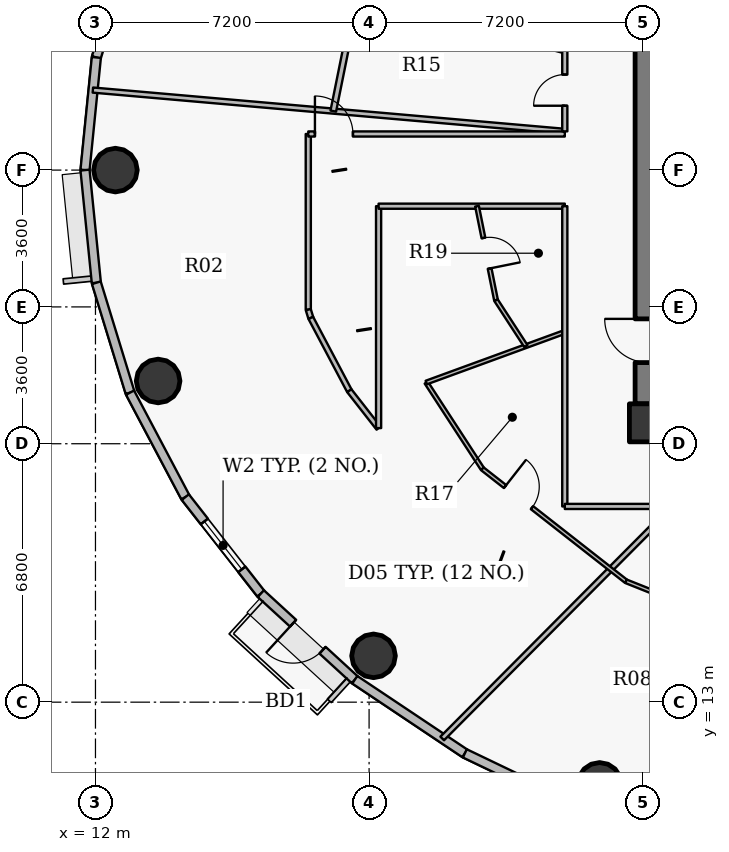
"""IFC4 building model, lengths in metres.
Left out: names, types, materials, properties, quantities, classifications, styles, units other than length and angle.
Written with IfcOpenShell. Run it as: python <this file> out.ifc"""

import sys

from ifc_helpers import new_model, si_unit, direction, frame, frame_2d, origin, origin_2d, place, context, subcontext, project, spatial, rectangle, hollow_circle, extrude, source, transform, mapped, element, fill, save


model = new_model("IFC4")
c1 = context("Model", 3, precision=1e-05, world=origin(), true_north=direction((0.0, 1.0)))
c2 = subcontext(c1, "Body", "Model", "MODEL_VIEW")
j1 = project(units=[si_unit("LENGTHUNIT", "METRE"), si_unit("PLANEANGLEUNIT", "RADIAN")], contexts=[c1])
p1 = place(None, origin())
s1 = spatial("IfcSite", under=j1, at=p1, CompositionType="ELEMENT")
p2 = place(p1, origin())
s2 = spatial("IfcBuilding", under=s1, at=p2, CompositionType="ELEMENT")
p3 = place(p2, frame((0.0, 0.0, 247.8)))
s3 = spatial("IfcBuildingStorey", under=s2, at=p3, CompositionType="ELEMENT", Elevation=247.8)
p4 = place(p3, frame((26.55, 20.35, 0.0), z_axis=(0.0, 0.0, 1.0), x_axis=(1.0, 0.0, 0.0)))
e1 = element("IfcColumn", 1, at=p4, inside=s3, PredefinedType="COLUMN", context=c2, shape_type="SweptSolid", body=[
    extrude(rectangle(XDim=1.0, YDim=1.0, at=origin_2d()), origin(), (0.0, 0.0, 1.0), 3.75),
])
p5 = place(p3, frame((26.55, 20.85, 0.0), z_axis=(0.0, 0.0, 1.0), x_axis=(0.0, 1.0, 0.0)))
e2 = element("IfcWall", 2, at=p5, inside=s3, PredefinedType="SHEAR", context=c2, shape_type="SweptSolid", body=[
    extrude(rectangle(XDim=12.3, YDim=0.7, at=frame_2d((6.15, 0.0))), origin(), (0.0, 0.0, 1.0), 3.05),
])
p6 = place(p5, frame((1.085, 0.0, 0.0)))
e3 = element("IfcOpeningElement", 3, at=p6, cuts=e2, PredefinedType="OPENING", context=c2, shape_type="SweptSolid", body=[
    extrude(rectangle(XDim=1.15, YDim=2.15, at=origin_2d()), frame((0.575, 0.36, 1.075), z_axis=(0.0, -1.0, 0.0), x_axis=(1.0, 0.0, 0.0)), (0.0, 0.0, 1.0), 0.72),
])
for number, where, z_axis, x_axis in (
    (4, (12.525, 27.0, 0.0), (0.0, 0.0, 1.0), (1.0, 0.0, 0.0)),
    (5, (13.649, 21.451, 0.0), (0.0, 0.0, 1.0), (1.0, 0.0, 0.0)),
    (6, (19.317, 14.219, 0.0), (0.0, 0.0, 1.0), (1.0, 0.0, 0.0)),
    (7, (25.265, 10.836, 0.0), (0.0, 0.0, 1.0), (1.0, 0.0, 0.0)),
):
    element("IfcColumn", number, at=place(p3, frame(where, z_axis=z_axis, x_axis=x_axis)), inside=s3, PredefinedType="COLUMN", context=c2, shape_type="SweptSolid", body=[
        extrude(hollow_circle(Radius=0.575, WallThickness=0.036, at=origin_2d()), origin(), (0.0, 0.0, 1.0), 3.75),
    ])
p7 = place(p3, frame((12.023, 29.964, 0.0), z_axis=(0.0, 0.0, 1.0), x_axis=(0.293132907334, 0.95607170162, 0.0)))
e8 = element("IfcWall", 8, at=p7, inside=s3, PredefinedType="SOLIDWALL", context=c2, shape_type="SweptSolid", body=[
    extrude(rectangle(XDim=3.025, YDim=0.24, at=frame_2d((1.512, 0.0))), origin(), (0.0, 0.0, 1.0), 3.5),
])
p8 = place(p7, frame((0.887, 0.0, 0.9)))
e9 = element("IfcOpeningElement", 9, at=p8, cuts=e8, PredefinedType="OPENING", context=c2, shape_type="SweptSolid", body=[
    extrude(rectangle(XDim=1.25, YDim=1.65, at=origin_2d()), frame((0.625, 0.13, 0.825), z_axis=(0.0, -1.0, 0.0), x_axis=(1.0, 0.0, 0.0)), (0.0, 0.0, 1.0), 0.26),
])
for number, where, z_axis, x_axis in (
    (10, (11.725, 27.0, 0.0), (0.0, 0.0, 1.0), (0.1, 0.995, 0.0)),
    (11, (12.023, 24.036, 0.0), (0.0, 0.0, 1.0), (-0.1, 0.995, 0.0)),
):
    element("IfcWall", number, at=place(p3, frame(where, z_axis=z_axis, x_axis=x_axis)), inside=s3, PredefinedType="SOLIDWALL", context=c2, shape_type="SweptSolid", body=[
        extrude(rectangle(XDim=2.979, YDim=0.24, at=frame_2d((1.489, 0.0))), origin(), (0.0, 0.0, 1.0), 3.5),
    ])
p9 = place(p3, frame((12.91, 21.144, 0.0), z_axis=(0.0, 0.0, 1.0), x_axis=(-0.293132907334, 0.95607170162, 0.0)))
e12 = element("IfcWall", 12, at=p9, inside=s3, PredefinedType="SOLIDWALL", context=c2, shape_type="SweptSolid", body=[
    extrude(rectangle(XDim=3.025, YDim=0.24, at=frame_2d((1.512, 0.0))), origin(), (0.0, 0.0, 1.0), 3.5),
])
p10 = place(p3, frame((14.364, 18.395, 0.0), z_axis=(0.0, 0.0, 1.0), x_axis=(-0.46766049993, 0.883908172157, 0.0)))
e13 = element("IfcWall", 13, at=p10, inside=s3, PredefinedType="SOLIDWALL", context=c2, shape_type="SweptSolid", body=[
    extrude(rectangle(XDim=3.11, YDim=0.24, at=frame_2d((1.555, 0.0))), origin(), (0.0, 0.0, 1.0), 3.5),
])
p11 = place(p3, frame((16.352, 15.855, 0.0), z_axis=(0.0, 0.0, 1.0), x_axis=(-0.616312344705, 0.787501805562, 0.0)))
e14 = element("IfcWall", 14, at=p11, inside=s3, PredefinedType="SOLIDWALL", context=c2, shape_type="SweptSolid", body=[
    extrude(rectangle(XDim=3.225, YDim=0.24, at=frame_2d((1.612, 0.0))), origin(), (0.0, 0.0, 1.0), 3.5),
])
p12 = place(p11, frame((0.812, 0.0, 0.9)))
e15 = element("IfcOpeningElement", 15, at=p12, cuts=e14, PredefinedType="OPENING", context=c2, shape_type="SweptSolid", body=[
    extrude(rectangle(XDim=1.6, YDim=1.75, at=origin_2d()), frame((0.8, 0.13, 0.875), z_axis=(0.0, -1.0, 0.0), x_axis=(1.0, 0.0, 0.0)), (0.0, 0.0, 1.0), 0.26),
])
p13 = place(p3, frame((18.824, 13.589, 0.0), z_axis=(0.0, 0.0, 1.0), x_axis=(-0.737123922599, 0.675757591694, 0.0)))
e16 = element("IfcWall", 16, at=p13, inside=s3, PredefinedType="SOLIDWALL", context=c2, shape_type="SweptSolid", body=[
    extrude(rectangle(XDim=3.354, YDim=0.24, at=frame_2d((1.677, 0.0))), origin(), (0.0, 0.0, 1.0), 3.5),
])
p14 = place(p13, frame((1.152, 0.0, 0.0)))
e17 = element("IfcOpeningElement", 17, at=p14, cuts=e16, PredefinedType="OPENING", context=c2, shape_type="SweptSolid", body=[
    extrude(rectangle(XDim=1.05, YDim=2.15, at=origin_2d()), frame((0.525, 0.13, 1.075), z_axis=(0.0, -1.0, 0.0), x_axis=(1.0, 0.0, 0.0)), (0.0, 0.0, 1.0), 0.26),
])
p15 = place(p3, frame((21.72, 11.652, 0.0), z_axis=(0.0, 0.0, 1.0), x_axis=(-0.831262496074, 0.555880079352, 0.0)))
e18 = element("IfcWall", 18, at=p15, inside=s3, PredefinedType="SOLIDWALL", context=c2, shape_type="SweptSolid", body=[
    extrude(rectangle(XDim=3.484, YDim=0.24, at=frame_2d((1.742, 0.0))), origin(), (0.0, 0.0, 1.0), 3.5),
])
p16 = place(p3, frame((24.969, 10.094, 0.0), z_axis=(0.0, 0.0, 1.0), x_axis=(-0.901598104751, 0.432574684313, 0.0)))
e19 = element("IfcWall", 19, at=p16, inside=s3, PredefinedType="SOLIDWALL", context=c2, shape_type="SweptSolid", body=[
    extrude(rectangle(XDim=3.604, YDim=0.24, at=frame_2d((1.802, 0.0))), origin(), (0.0, 0.0, 1.0), 3.5),
])
p17 = place(p3, frame((11.932, 29.106, 0.0), z_axis=(0.0, 0.0, 1.0), x_axis=(0.996194886619, -0.08715358784, 0.0)))
e20 = element("IfcWall", 20, at=p17, inside=s3, PredefinedType="PARTITIONING", context=c2, shape_type="SweptSolid", body=[
    extrude(rectangle(XDim=12.466, YDim=0.135, at=frame_2d((6.233, 0.0))), origin(), (0.0, 0.0, 1.0), 2.985),
])
p18 = place(p3, frame((13.082, 33.192, 0.0), z_axis=(0.0, 0.0, 1.0), x_axis=(0.965379480797, -0.26084949311, 0.0)))
e21 = element("IfcWall", 21, at=p18, inside=s3, PredefinedType="PARTITIONING", context=c2, shape_type="SweptSolid", body=[
    extrude(rectangle(XDim=11.672, YDim=0.15, at=frame_2d((5.836, 0.0))), origin(), (0.0, 0.0, 1.0), 2.985),
])
p19 = place(p18, frame((2.549, 0.0, 0.0)))
e22 = element("IfcOpeningElement", 22, at=p19, cuts=e21, PredefinedType="OPENING", context=c2, shape_type="SweptSolid", body=[
    extrude(rectangle(XDim=1.05, YDim=2.15, at=origin_2d()), frame((0.525, 0.085, 1.075), z_axis=(0.0, -1.0, 0.0), x_axis=(1.0, 0.0, 0.0)), (0.0, 0.0, 1.0), 0.17),
])
p20 = place(p3, frame((17.6, 23.328, 0.0), z_axis=(0.0, 0.0, 1.0), x_axis=(0.0, 1.0, 0.0)))
e23 = element("IfcWall", 23, at=p20, inside=s3, PredefinedType="PARTITIONING", context=c2, shape_type="SweptSolid", body=[
    extrude(rectangle(XDim=4.622, YDim=0.135, at=frame_2d((2.311, 0.0))), origin(), (0.0, 0.0, 1.0), 2.935),
])
p21 = place(p3, frame((17.6, 23.328, 0.0), z_axis=(0.0, 0.0, 1.0), x_axis=(0.292875000845, -0.956150738053, 0.0)))
e24 = element("IfcWall", 24, at=p21, inside=s3, PredefinedType="PARTITIONING", context=c2, shape_type="SweptSolid", body=[
    extrude(rectangle(XDim=0.227, YDim=0.135, at=frame_2d((0.113, 0.0))), origin(), (0.0, 0.0, 1.0), 3.5),
])
p22 = place(p3, frame((17.6, 27.95, 0.0), z_axis=(0.0, 0.0, 1.0), x_axis=(1.0, 0.0, 0.0)))
e25 = element("IfcWall", 25, at=p22, inside=s3, PredefinedType="PARTITIONING", context=c2, shape_type="SweptSolid", body=[
    extrude(rectangle(XDim=6.75, YDim=0.135, at=frame_2d((3.375, 0.0))), origin(), (0.0, 0.0, 1.0), 3.5),
])
p23 = place(p22, frame((0.175, 0.0, 0.0)))
e26 = element("IfcOpeningElement", 26, at=p23, cuts=e25, PredefinedType="OPENING", context=c2, shape_type="SweptSolid", body=[
    extrude(rectangle(XDim=1.0, YDim=2.15, at=origin_2d()), frame((0.5, 0.078, 1.075), z_axis=(0.0, -1.0, 0.0), x_axis=(1.0, 0.0, 0.0)), (0.0, 0.0, 1.0), 0.155),
])
p24 = place(p3, frame((17.667, 23.111, 0.0), z_axis=(0.0, 0.0, 1.0), x_axis=(0.467675622269, -0.883900171024, 0.0)))
e27 = element("IfcWall", 27, at=p24, inside=s3, PredefinedType="PARTITIONING", context=c2, shape_type="SweptSolid", body=[
    extrude(rectangle(XDim=2.168, YDim=0.135, at=frame_2d((1.084, 0.0))), origin(), (0.0, 0.0, 1.0), 2.935),
])
p25 = place(p3, frame((18.258, 28.552, 0.0), z_axis=(0.0, 0.0, 1.0), x_axis=(0.198206962436, 0.980160191011, 0.0)))
e28 = element("IfcWall", 28, at=p25, inside=s3, PredefinedType="PARTITIONING", context=c2, shape_type="SweptSolid", body=[
    extrude(rectangle(XDim=2.874, YDim=0.15, at=frame_2d((1.437, 0.0))), origin(), (0.0, 0.0, 1.0), 3.5),
])
p26 = place(p3, frame((18.681, 21.194, 0.0), z_axis=(0.0, 0.0, 1.0), x_axis=(0.616239706802, -0.787558647823, 0.0)))
e29 = element("IfcWall", 29, at=p26, inside=s3, PredefinedType="PARTITIONING", context=c2, shape_type="SweptSolid", body=[
    extrude(rectangle(XDim=1.248, YDim=0.135, at=frame_2d((0.624, 0.0))), origin(), (0.0, 0.0, 1.0), 3.5),
])
p27 = place(p3, frame((19.45, 20.211, 0.0), z_axis=(0.0, 0.0, 1.0), x_axis=(0.0, 1.0, 0.0)))
e30 = element("IfcWall", 30, at=p27, inside=s3, PredefinedType="PARTITIONING", context=c2, shape_type="SweptSolid", body=[
    extrude(rectangle(XDim=5.839, YDim=0.135, at=frame_2d((2.919, 0.0))), origin(), (0.0, 0.0, 1.0), 2.935),
])
p28 = place(p3, frame((19.45, 26.05, 0.0), z_axis=(0.0, 0.0, 1.0), x_axis=(1.0, 0.0, 0.0)))
e31 = element("IfcWall", 31, at=p28, inside=s3, PredefinedType="PARTITIONING", context=c2, shape_type="SweptSolid", body=[
    extrude(rectangle(XDim=4.9, YDim=0.135, at=frame_2d((2.45, 0.0))), origin(), (0.0, 0.0, 1.0), 3.5),
])
p29 = place(p3, frame((20.704, 21.41, 0.0), z_axis=(0.0, 0.0, 1.0), x_axis=(0.545431767871, -0.838155228223, 0.0)))
e32 = element("IfcWall", 32, at=p29, inside=s3, PredefinedType="PARTITIONING", context=c2, shape_type="SweptSolid", body=[
    extrude(rectangle(XDim=2.709, YDim=0.1, at=frame_2d((1.354, 0.0))), origin(), (0.0, 0.0, 1.0), 3.5),
])
p30 = place(p3, frame((20.704, 21.41, 0.0), z_axis=(0.0, 0.0, 1.0), x_axis=(0.939230218299, 0.343287921481, 0.0)))
e33 = element("IfcWall", 33, at=p30, inside=s3, PredefinedType="PARTITIONING", context=c2, shape_type="SweptSolid", body=[
    extrude(rectangle(XDim=3.882, YDim=0.1, at=frame_2d((1.941, 0.0))), origin(), (0.0, 0.0, 1.0), 3.5),
])
p31 = place(p3, frame((21.124, 12.045, 0.0), z_axis=(0.0, 0.0, 1.0), x_axis=(0.70521888308, 0.708989652215, 0.0)))
e34 = element("IfcWall", 34, at=p31, inside=s3, PredefinedType="PARTITIONING", context=c2, shape_type="SweptSolid", body=[
    extrude(rectangle(XDim=8.611, YDim=0.135, at=frame_2d((4.306, 0.0))), origin(), (0.0, 0.0, 1.0), 2.985),
])
p32 = place(p3, frame((22.04, 26.05, 0.0), z_axis=(0.0, 0.0, 1.0), x_axis=(0.198273230268, -0.980146788067, 0.0)))
e35 = element("IfcWall", 35, at=p32, inside=s3, PredefinedType="PARTITIONING", context=c2, shape_type="SweptSolid", body=[
    extrude(rectangle(XDim=2.524, YDim=0.1, at=frame_2d((1.262, 0.0))), origin(), (0.0, 0.0, 1.0), 2.935),
])
p33 = place(p32, frame((0.852, 0.0, 0.0)))
e36 = element("IfcOpeningElement", 36, at=p33, cuts=e35, PredefinedType="OPENING", context=c2, shape_type="SweptSolid", body=[
    extrude(rectangle(XDim=0.82, YDim=2.1, at=origin_2d()), frame((0.41, 0.06, 1.05), z_axis=(0.0, -1.0, 0.0), x_axis=(1.0, 0.0, 0.0)), (0.0, 0.0, 1.0), 0.12),
])
p34 = place(p3, frame((22.182, 19.139, 0.0), z_axis=(0.0, 0.0, 1.0), x_axis=(0.787386902975, -0.616459134917, 0.0)))
e37 = element("IfcWall", 37, at=p34, inside=s3, PredefinedType="PARTITIONING", context=c2, shape_type="SweptSolid", body=[
    extrude(rectangle(XDim=4.799, YDim=0.1, at=frame_2d((2.399, 0.0))), origin(), (0.0, 0.0, 1.0), 2.935),
])
p35 = place(p34, frame((0.757, 0.0, 0.0)))
e38 = element("IfcOpeningElement", 38, at=p35, cuts=e37, PredefinedType="OPENING", context=c2, shape_type="SweptSolid", body=[
    extrude(rectangle(XDim=0.9, YDim=2.1, at=origin_2d()), frame((0.45, 0.06, 1.05), z_axis=(0.0, -1.0, 0.0), x_axis=(1.0, 0.0, 0.0)), (0.0, 0.0, 1.0), 0.12),
])
p36 = place(p3, frame((22.541, 23.576, 0.0), z_axis=(0.0, 0.0, 1.0), x_axis=(0.545399208044, -0.838176415717, 0.0)))
e39 = element("IfcWall", 39, at=p36, inside=s3, PredefinedType="PARTITIONING", context=c2, shape_type="SweptSolid", body=[
    extrude(rectangle(XDim=1.441, YDim=0.1, at=frame_2d((0.72, 0.0))), origin(), (0.0, 0.0, 1.0), 2.935),
])
p37 = place(p3, frame((24.35, 18.15, 0.0), z_axis=(0.0, 0.0, 1.0), x_axis=(0.0, 1.0, 0.0)))
e40 = element("IfcWall", 40, at=p37, inside=s3, PredefinedType="PARTITIONING", context=c2, shape_type="SweptSolid", body=[
    extrude(rectangle(XDim=7.9, YDim=0.135, at=frame_2d((3.95, 0.0))), origin(), (0.0, 0.0, 1.0), 2.935),
])
p38 = place(p3, frame((24.35, 18.15, 0.0), z_axis=(0.0, 0.0, 1.0), x_axis=(1.0, 0.0, 0.0)))
e41 = element("IfcWall", 41, at=p38, inside=s3, PredefinedType="PARTITIONING", context=c2, shape_type="SweptSolid", body=[
    extrude(rectangle(XDim=23.85, YDim=0.135, at=frame_2d((11.925, 0.0))), origin(), (0.0, 0.0, 1.0), 2.935),
])
p39 = place(p38, frame((10.168, 0.0, 0.0)))
e42 = element("IfcOpeningElement", 42, at=p39, cuts=e41, PredefinedType="OPENING", context=c2, shape_type="SweptSolid", body=[
    extrude(rectangle(XDim=1.0, YDim=2.15, at=origin_2d()), frame((0.5, 0.078, 1.075), z_axis=(0.0, -1.0, 0.0), x_axis=(1.0, 0.0, 0.0)), (0.0, 0.0, 1.0), 0.155),
])
p40 = place(p3, frame((24.35, 28.019, 0.0), z_axis=(0.0, 0.0, 1.0), x_axis=(0.0, 1.0, 0.0)))
e43 = element("IfcWall", 43, at=p40, inside=s3, PredefinedType="PARTITIONING", context=c2, shape_type="SweptSolid", body=[
    extrude(rectangle(XDim=7.831, YDim=0.135, at=frame_2d((3.916, 0.0))), origin(), (0.0, 0.0, 1.0), 2.935),
])
p41 = place(p40, frame((4.435, 0.0, 0.0)))
e44 = element("IfcOpeningElement", 44, at=p41, cuts=e43, PredefinedType="OPENING", context=c2, shape_type="SweptSolid", body=[
    extrude(rectangle(XDim=1.05, YDim=2.15, at=origin_2d()), frame((0.525, 0.078, 1.075), z_axis=(0.0, -1.0, 0.0), x_axis=(1.0, 0.0, 0.0)), (0.0, 0.0, 1.0), 0.155),
])
p42 = place(p40, frame((0.674, 0.0, 0.0)))
e45 = element("IfcOpeningElement", 45, at=p42, cuts=e43, PredefinedType="OPENING", context=c2, shape_type="SweptSolid", body=[
    extrude(rectangle(XDim=0.82, YDim=2.1, at=origin_2d()), frame((0.41, 0.078, 1.05), z_axis=(0.0, -1.0, 0.0), x_axis=(1.0, 0.0, 0.0)), (0.0, 0.0, 1.0), 0.155),
])
p43 = place(p3, frame((25.961, 16.181, 0.0), z_axis=(0.0, 0.0, 1.0), x_axis=(0.928800189679, -0.370580905678, 0.0)))
e46 = element("IfcWall", 46, at=p43, inside=s3, PredefinedType="PARTITIONING", context=c2, shape_type="SweptSolid", body=[
    extrude(rectangle(XDim=4.991, YDim=0.1, at=frame_2d((2.496, 0.0))), origin(), (0.0, 0.0, 1.0), 2.935),
])
p44 = place(p43, frame((3.201, 0.0, 0.0)))
e47 = element("IfcOpeningElement", 47, at=p44, cuts=e46, PredefinedType="OPENING", context=c2, shape_type="SweptSolid", body=[
    extrude(rectangle(XDim=0.9, YDim=2.1, at=origin_2d()), frame((0.45, 0.06, 1.05), z_axis=(0.0, -1.0, 0.0), x_axis=(1.0, 0.0, 0.0)), (0.0, 0.0, 1.0), 0.12),
])
p45 = place(p3, frame((26.2, 20.84, 0.0), z_axis=(0.0, 0.0, 1.0), x_axis=(0.0, -1.0, 0.0)))
e48 = element("IfcWall", 48, at=p45, inside=s3, PredefinedType="PARTITIONING", context=c2, shape_type="SweptSolid", body=[
    extrude(rectangle(XDim=0.84, YDim=0.135, at=frame_2d((0.42, 0.0))), origin(), (0.0, 0.0, 1.0), 3.5),
])
p46 = place(p3, frame((26.508, 20.0, 0.0), z_axis=(0.0, 0.0, 1.0), x_axis=(1.0, 0.0, 0.0)))
e49 = element("IfcWall", 49, at=p46, inside=s3, PredefinedType="PARTITIONING", context=c2, shape_type="SweptSolid", body=[
    extrude(rectangle(XDim=0.532, YDim=0.135, at=frame_2d((0.266, 0.0))), origin(), (0.0, 0.0, 1.0), 2.935),
])
m1 = source(origin(), c2, "Body", "SweptSolid", [
    extrude(rectangle(XDim=1.6, YDim=1.75, at=origin_2d()), frame((0.8, 0.03, 0.875), z_axis=(0.0, -1.0, 0.0), x_axis=(1.0, 0.0, 0.0)), (0.0, 0.0, 1.0), 0.06),
])
p47 = place(p12, origin())
e50 = element("IfcWindow", 50, at=p47, inside=s3, PartitioningType="DOUBLE_PANEL_VERTICAL", PredefinedType="WINDOW", context=c2, shape_type="MappedRepresentation", body=[
    mapped(m1, transform((0.0, 0.0, 0.0), x_axis=(1.0, 0.0, 0.0), y_axis=(0.0, 1.0, 0.0), z_axis=(0.0, 0.0, 1.0), scale=1.0)),
])
fill(e15, e50)
m2 = source(origin(), c2, "Body", "SweptSolid", [
    extrude(rectangle(XDim=1.05, YDim=2.15, at=origin_2d()), frame((0.525, 0.025, 1.075), z_axis=(0.0, -1.0, 0.0), x_axis=(1.0, 0.0, 0.0)), (0.0, 0.0, 1.0), 0.05),
])
p48 = place(p14, origin())
e51 = element("IfcDoor", 51, at=p48, inside=s3, OperationType="SINGLE_SWING_RIGHT", PredefinedType="DOOR", context=c2, shape_type="MappedRepresentation", body=[
    mapped(m2, transform((0.0, 0.0, 0.0), x_axis=(1.0, 0.0, 0.0), y_axis=(0.0, 1.0, 0.0), z_axis=(0.0, 0.0, 1.0), scale=1.0)),
])
fill(e17, e51)
m3 = source(origin(), c2, "Body", "SweptSolid", [
    extrude(rectangle(XDim=1.15, YDim=2.15, at=origin_2d()), frame((0.575, 0.025, 1.075), z_axis=(0.0, -1.0, 0.0), x_axis=(1.0, 0.0, 0.0)), (0.0, 0.0, 1.0), 0.05),
])
p49 = place(p6, origin())
e52 = element("IfcDoor", 52, at=p49, inside=s3, OperationType="SINGLE_SWING_RIGHT", PredefinedType="DOOR", context=c2, shape_type="MappedRepresentation", body=[
    mapped(m3, transform((0.0, 0.0, 0.0), x_axis=(1.0, 0.0, 0.0), y_axis=(0.0, 1.0, 0.0), z_axis=(0.0, 0.0, 1.0), scale=1.0)),
])
fill(e3, e52)
m4 = source(origin(), c2, "Body", "SweptSolid", [
    extrude(rectangle(XDim=1.0, YDim=2.15, at=origin_2d()), frame((0.5, 0.025, 1.075), z_axis=(0.0, -1.0, 0.0), x_axis=(1.0, 0.0, 0.0)), (0.0, 0.0, 1.0), 0.05),
])
p50 = place(p23, origin())
e53 = element("IfcDoor", 53, at=p50, inside=s3, OperationType="SINGLE_SWING_LEFT", PredefinedType="DOOR", context=c2, shape_type="MappedRepresentation", body=[
    mapped(m4, transform((0.0, 0.0, 0.0), x_axis=(1.0, 0.0, 0.0), y_axis=(0.0, 1.0, 0.0), z_axis=(0.0, 0.0, 1.0), scale=1.0)),
])
fill(e26, e53)
m5 = source(origin(), c2, "Body", "SweptSolid", [
    extrude(rectangle(XDim=0.82, YDim=2.1, at=origin_2d()), frame((0.41, 0.025, 1.05), z_axis=(0.0, -1.0, 0.0), x_axis=(1.0, 0.0, 0.0)), (0.0, 0.0, 1.0), 0.05),
])
p51 = place(p33, origin())
e54 = element("IfcDoor", 54, at=p51, inside=s3, OperationType="SINGLE_SWING_RIGHT", PredefinedType="DOOR", context=c2, shape_type="MappedRepresentation", body=[
    mapped(m5, transform((0.0, 0.0, 0.0), x_axis=(1.0, 0.0, 0.0), y_axis=(0.0, 1.0, 0.0), z_axis=(0.0, 0.0, 1.0), scale=1.0)),
])
fill(e36, e54)
m6 = source(origin(), c2, "Body", "SweptSolid", [
    extrude(rectangle(XDim=0.9, YDim=2.1, at=origin_2d()), frame((0.45, 0.025, 1.05), z_axis=(0.0, -1.0, 0.0), x_axis=(1.0, 0.0, 0.0)), (0.0, 0.0, 1.0), 0.05),
])
p52 = place(p35, origin())
e55 = element("IfcDoor", 55, at=p52, inside=s3, OperationType="SINGLE_SWING_LEFT", PredefinedType="DOOR", context=c2, shape_type="MappedRepresentation", body=[
    mapped(m6, transform((0.0, 0.0, 0.0), x_axis=(1.0, 0.0, 0.0), y_axis=(0.0, 1.0, 0.0), z_axis=(0.0, 0.0, 1.0), scale=1.0)),
])
fill(e38, e55)
p53 = place(p42, origin())
e56 = element("IfcDoor", 56, at=p53, inside=s3, OperationType="SINGLE_SWING_LEFT", PredefinedType="DOOR", context=c2, shape_type="MappedRepresentation", body=[
    mapped(m5, transform((0.0, 0.0, 0.0), x_axis=(1.0, 0.0, 0.0), y_axis=(0.0, 1.0, 0.0), z_axis=(0.0, 0.0, 1.0), scale=1.0)),
])
fill(e45, e56)
save(model, sys.argv[1])
